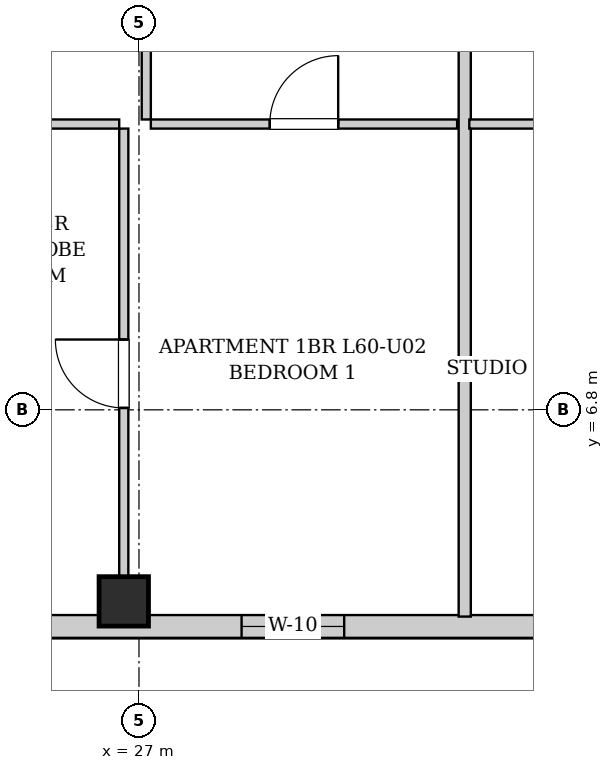
"""IFC4 building model, lengths in metres.
Left out: names, types, materials, properties, quantities, classifications, styles, units other than length and angle.
Written with IfcOpenShell. Run it as: python <this file> out.ifc"""

import sys

from ifc_helpers import new_model, si_unit, direction, frame, frame_2d, origin, origin_2d, place, context, subcontext, project, spatial, rectangle, extrude, element, fill, save


model = new_model("IFC4")
c1 = context("Model", 3, precision=1e-05, world=origin(), true_north=direction((0.0, 1.0)))
c2 = subcontext(c1, "Body", "Model", "MODEL_VIEW")
j1 = project(units=[si_unit("LENGTHUNIT", "METRE"), si_unit("PLANEANGLEUNIT", "RADIAN")], contexts=[c1])
p1 = place(None, origin())
s1 = spatial("IfcSite", under=j1, at=p1, CompositionType="ELEMENT")
p2 = place(p1, origin())
s2 = spatial("IfcBuilding", under=s1, at=p2, CompositionType="ELEMENT")
p3 = place(p2, frame((0.0, 0.0, 207.4)))
s3 = spatial("IfcBuildingStorey", under=s2, at=p3, CompositionType="ELEMENT", Elevation=207.4)
p4 = place(p3, frame((26.8, 4.28, 0.0), z_axis=(0.0, 0.0, 1.0), x_axis=(1.0, 0.0, 0.0)))
e1 = element("IfcColumn", 1, at=p4, inside=s3, PredefinedType="COLUMN", context=c2, shape_type="SweptSolid", body=[
    extrude(rectangle(XDim=0.65, YDim=0.65, at=origin_2d()), origin(), (0.0, 0.0, 1.0), 3.3),
])
p5 = place(p3, frame((37.8, 3.95, 0.0), z_axis=(0.0, 0.0, 1.0), x_axis=(-1.0, 0.0, 0.0)))
e2 = element("IfcWall", 2, at=p5, inside=s3, PredefinedType="SOLIDWALL", context=c2, shape_type="SweptSolid", body=[
    extrude(rectangle(XDim=18.15, YDim=0.3, at=frame_2d((9.075, 0.0))), origin(), (0.0, 0.0, 1.0), 3.04),
])
p6 = place(p5, frame((15.6, 0.0, 0.55)))
e3 = element("IfcOpeningElement", 3, at=p6, cuts=e2, PredefinedType="OPENING", context=c2, shape_type="SweptSolid", body=[
    extrude(rectangle(XDim=1.35, YDim=1.2, at=frame_2d((0.675, 0.6))), frame((0.0, 0.16, 0.0), z_axis=(0.0, -1.0, 0.0), x_axis=(1.0, 0.0, 0.0)), (0.0, 0.0, 1.0), 0.32),
])
p7 = place(p5, frame((8.1, 0.0, 0.55)))
e4 = element("IfcOpeningElement", 4, at=p7, cuts=e2, PredefinedType="OPENING", context=c2, shape_type="SweptSolid", body=[
    extrude(rectangle(XDim=1.35, YDim=1.2, at=frame_2d((0.675, 0.6))), frame((0.0, 0.16, 0.0), z_axis=(0.0, -1.0, 0.0), x_axis=(1.0, 0.0, 0.0)), (0.0, 0.0, 1.0), 0.32),
])
p8 = place(p5, frame((2.7, 0.0, 0.55)))
e5 = element("IfcOpeningElement", 5, at=p8, cuts=e2, PredefinedType="OPENING", context=c2, shape_type="SweptSolid", body=[
    extrude(rectangle(XDim=1.35, YDim=1.2, at=frame_2d((0.675, 0.6))), frame((0.0, 0.16, 0.0), z_axis=(0.0, -1.0, 0.0), x_axis=(1.0, 0.0, 0.0)), (0.0, 0.0, 1.0), 0.32),
])
p9 = place(p5, frame((1.035, 0.0, 0.55)))
e6 = element("IfcOpeningElement", 6, at=p9, cuts=e2, PredefinedType="OPENING", context=c2, shape_type="SweptSolid", body=[
    extrude(rectangle(XDim=1.35, YDim=1.2, at=frame_2d((0.675, 0.6))), frame((0.0, 0.16, 0.0), z_axis=(0.0, -1.0, 0.0), x_axis=(1.0, 0.0, 0.0)), (0.0, 0.0, 1.0), 0.32),
])
p10 = place(p3, frame((27.096, 10.62, 0.0), z_axis=(0.0, 0.0, 1.0), x_axis=(0.0, 1.0, 0.0)))
e7 = element("IfcWall", 7, at=p10, inside=s3, PredefinedType="PARTITIONING", context=c2, shape_type="SweptSolid", body=[
    extrude(rectangle(XDim=2.85, YDim=0.12, at=frame_2d((1.425, 0.0))), origin(), (0.0, 0.0, 1.0), 3.04),
])
p11 = place(p10, frame((0.975, 0.0, 0.0)))
e8 = element("IfcOpeningElement", 8, at=p11, cuts=e7, PredefinedType="OPENING", context=c2, shape_type="SweptSolid", body=[
    extrude(rectangle(XDim=0.9, YDim=2.05, at=frame_2d((0.45, 1.025))), frame((0.0, 0.07, 0.0), z_axis=(0.0, -1.0, 0.0), x_axis=(1.0, 0.0, 0.0)), (0.0, 0.0, 1.0), 0.14),
])
p12 = place(p3, frame((23.886, 10.56, 0.0), z_axis=(0.0, 0.0, 1.0), x_axis=(1.0, 0.0, 0.0)))
e9 = element("IfcWall", 9, at=p12, inside=s3, PredefinedType="PARTITIONING", context=c2, shape_type="SweptSolid", body=[
    extrude(rectangle(XDim=2.854, YDim=0.12, at=frame_2d((1.427, 0.0))), origin(), (0.0, 0.0, 1.0), 3.04),
])
p13 = place(p12, frame((0.977, 0.0, 0.0)))
e10 = element("IfcOpeningElement", 10, at=p13, cuts=e9, PredefinedType="OPENING", context=c2, shape_type="SweptSolid", body=[
    extrude(rectangle(XDim=0.9, YDim=2.05, at=frame_2d((0.45, 1.025))), frame((0.0, 0.07, 0.0), z_axis=(0.0, -1.0, 0.0), x_axis=(1.0, 0.0, 0.0)), (0.0, 0.0, 1.0), 0.14),
])
p14 = place(p3, frame((27.156, 10.56, 0.0), z_axis=(0.0, 0.0, 1.0), x_axis=(1.0, 0.0, 0.0)))
e11 = element("IfcWall", 11, at=p14, inside=s3, PredefinedType="PARTITIONING", context=c2, shape_type="SweptSolid", body=[
    extrude(rectangle(XDim=4.03, YDim=0.12, at=frame_2d((2.015, 0.0))), origin(), (0.0, 0.0, 1.0), 3.04),
])
p15 = place(p14, frame((1.565, 0.0, 0.0)))
e12 = element("IfcOpeningElement", 12, at=p15, cuts=e11, PredefinedType="OPENING", context=c2, shape_type="SweptSolid", body=[
    extrude(rectangle(XDim=0.9, YDim=2.05, at=frame_2d((0.45, 1.025))), frame((0.0, 0.07, 0.0), z_axis=(0.0, -1.0, 0.0), x_axis=(1.0, 0.0, 0.0)), (0.0, 0.0, 1.0), 0.14),
])
p16 = place(p3, frame((26.8, 4.08, 0.0), z_axis=(0.0, 0.0, 1.0), x_axis=(0.0, 1.0, 0.0)))
e13 = element("IfcWall", 13, at=p16, inside=s3, PredefinedType="PARTITIONING", context=c2, shape_type="SweptSolid", body=[
    extrude(rectangle(XDim=6.42, YDim=0.12, at=frame_2d((3.21, 0.0))), origin(), (0.0, 0.0, 1.0), 3.04),
])
p17 = place(p16, frame((2.745, 0.0, 0.0)))
e14 = element("IfcOpeningElement", 14, at=p17, cuts=e13, PredefinedType="OPENING", context=c2, shape_type="SweptSolid", body=[
    extrude(rectangle(XDim=0.9, YDim=2.05, at=frame_2d((0.45, 1.025))), frame((0.0, 0.07, 0.0), z_axis=(0.0, -1.0, 0.0), x_axis=(1.0, 0.0, 0.0)), (0.0, 0.0, 1.0), 0.14),
])
p18 = place(p3, frame((31.286, 4.08, 0.0), z_axis=(0.0, 0.0, 1.0), x_axis=(0.0, 1.0, 0.0)))
e15 = element("IfcWall", 15, at=p18, inside=s3, PredefinedType="PARTITIONING", context=c2, shape_type="SweptSolid", body=[
    extrude(rectangle(XDim=9.39, YDim=0.16, at=frame_2d((4.695, 0.0))), origin(), (0.0, 0.0, 1.0), 3.04),
])
p19 = place(p3, frame((31.346, 10.56, 0.0), z_axis=(0.0, 0.0, 1.0), x_axis=(1.0, 0.0, 0.0)))
e16 = element("IfcWall", 16, at=p19, inside=s3, PredefinedType="PARTITIONING", context=c2, shape_type="SweptSolid", body=[
    extrude(rectangle(XDim=1.912, YDim=0.12, at=frame_2d((0.956, 0.0))), origin(), (0.0, 0.0, 1.0), 3.04),
])
p20 = place(p15, origin())
e17 = element("IfcDoor", 17, at=p20, inside=s3, OperationType="SINGLE_SWING_RIGHT", PredefinedType="DOOR", context=c2, shape_type="SweptSolid", body=[
    extrude(rectangle(XDim=0.9, YDim=2.05, at=frame_2d((0.45, 1.025))), frame((0.0, 0.025, 0.0), z_axis=(0.0, -1.0, 0.0), x_axis=(1.0, 0.0, 0.0)), (0.0, 0.0, 1.0), 0.05),
])
fill(e12, e17)
p21 = place(p17, origin())
e18 = element("IfcDoor", 18, at=p21, inside=s3, OperationType="SINGLE_SWING_RIGHT", PredefinedType="DOOR", context=c2, shape_type="SweptSolid", body=[
    extrude(rectangle(XDim=0.9, YDim=2.05, at=frame_2d((0.45, 1.025))), frame((0.0, 0.025, 0.0), z_axis=(0.0, -1.0, 0.0), x_axis=(1.0, 0.0, 0.0)), (0.0, 0.0, 1.0), 0.05),
])
fill(e14, e18)
p22 = place(p7, origin())
e19 = element("IfcWindow", 19, at=p22, inside=s3, PartitioningType="SINGLE_PANEL", PredefinedType="WINDOW", context=c2, shape_type="SweptSolid", body=[
    extrude(rectangle(XDim=1.35, YDim=1.2, at=frame_2d((0.675, 0.6))), frame((0.0, 0.03, 0.0), z_axis=(0.0, -1.0, 0.0), x_axis=(1.0, 0.0, 0.0)), (0.0, 0.0, 1.0), 0.06),
])
fill(e4, e19)
save(model, sys.argv[1])
